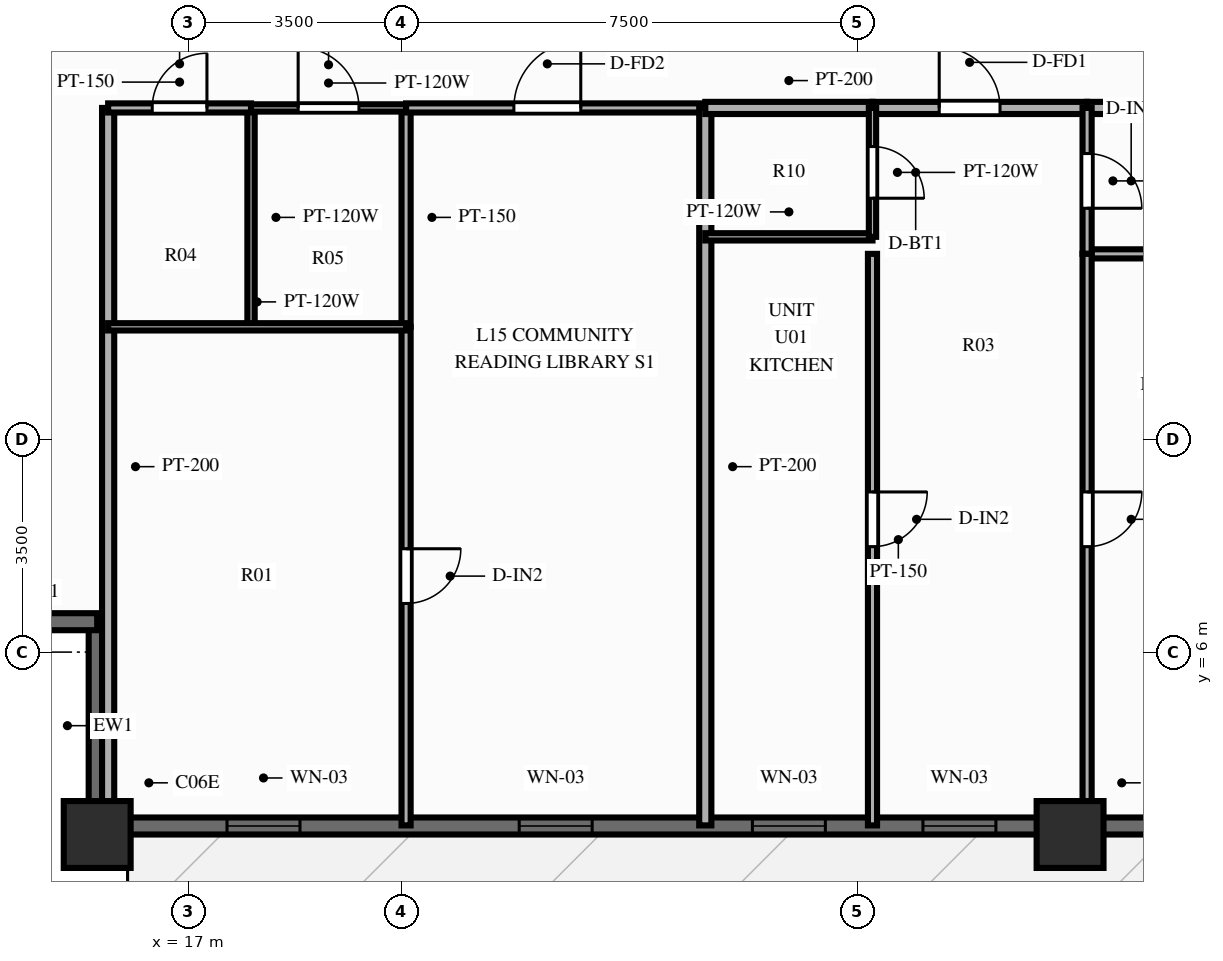
"""IFC4 building model, lengths in metres.
Left out: names, types, materials, properties, quantities, classifications, styles, units other than length and angle.
Written with IfcOpenShell. Run it as: python <this file> out.ifc"""

import sys

from ifc_helpers import new_model, si_unit, direction, frame, frame_2d, origin, origin_2d, place, context, subcontext, project, spatial, rectangle, extrude, source, transform, mapped, element, fill, save


model = new_model("IFC4")
c1 = context("Model", 3, precision=1e-05, world=origin(), true_north=direction((0.0, 1.0)))
c2 = subcontext(c1, "Body", "Model", "MODEL_VIEW")
j1 = project(units=[si_unit("LENGTHUNIT", "METRE"), si_unit("PLANEANGLEUNIT", "RADIAN")], contexts=[c1])
p1 = place(None, origin())
s1 = spatial("IfcSite", under=j1, at=p1, CompositionType="ELEMENT")
p2 = place(p1, origin())
s2 = spatial("IfcBuilding", under=s1, at=p2, CompositionType="ELEMENT")
p3 = place(p2, frame((0.0, 0.0, 49.4)))
s3 = spatial("IfcBuildingStorey", under=s2, at=p3, CompositionType="ELEMENT", Elevation=49.4)
m1 = source(origin(), c2, "Body", "SweptSolid", [
    extrude(rectangle(XDim=1.1, YDim=1.1, at=origin_2d()), origin(), (0.0, 0.0, 1.0), 3.0),
])
for number, where, z_axis, x_axis in (
    (1, (15.5, 3.0, 0.0), (0.0, 0.0, 1.0), (1.0, 0.0, 0.0)),
    (2, (31.5, 3.0, 0.0), (0.0, 0.0, 1.0), (1.0, 0.0, 0.0)),
):
    element("IfcColumn", number, at=place(p3, frame(where, z_axis=z_axis, x_axis=x_axis)), inside=s3, PredefinedType="COLUMN", context=c2, shape_type="MappedRepresentation", body=[
        mapped(m1, transform((0.0, 0.0, 0.0), scale=1.0)),
    ])
p4 = place(p3, frame((15.5, 3.14, 0.0), z_axis=(0.0, 0.0, 1.0), x_axis=(1.0, 0.0, 0.0)))
e3 = element("IfcWall", 3, at=p4, inside=s3, PredefinedType="SOLIDWALL", context=c2, shape_type="SweptSolid", body=[
    extrude(rectangle(XDim=45.0, YDim=0.28, at=frame_2d((22.5, 0.0))), origin(), (0.0, 0.0, 1.0), 2.28),
])
p5 = place(p4, frame((2.135, 0.0, 0.25)))
e4 = element("IfcOpeningElement", 4, at=p5, cuts=e3, PredefinedType="OPENING", context=c2, shape_type="SweptSolid", body=[
    extrude(rectangle(XDim=1.2, YDim=1.5, at=frame_2d((0.6, 0.75))), frame((0.0, 0.152, 0.0), z_axis=(0.0, -1.0, 0.0), x_axis=(1.0, 0.0, 0.0)), (0.0, 0.0, 1.0), 0.304),
])
p6 = place(p4, frame((6.94, 0.0, 0.25)))
e5 = element("IfcOpeningElement", 5, at=p6, cuts=e3, PredefinedType="OPENING", context=c2, shape_type="SweptSolid", body=[
    extrude(rectangle(XDim=1.2, YDim=1.5, at=frame_2d((0.6, 0.75))), frame((0.0, 0.152, 0.0), z_axis=(0.0, -1.0, 0.0), x_axis=(1.0, 0.0, 0.0)), (0.0, 0.0, 1.0), 0.304),
])
p7 = place(p4, frame((10.776, 0.0, 0.25)))
e6 = element("IfcOpeningElement", 6, at=p7, cuts=e3, PredefinedType="OPENING", context=c2, shape_type="SweptSolid", body=[
    extrude(rectangle(XDim=1.2, YDim=1.5, at=frame_2d((0.6, 0.75))), frame((0.0, 0.152, 0.0), z_axis=(0.0, -1.0, 0.0), x_axis=(1.0, 0.0, 0.0)), (0.0, 0.0, 1.0), 0.304),
])
p8 = place(p4, frame((13.58, 0.0, 0.25)))
e7 = element("IfcOpeningElement", 7, at=p8, cuts=e3, PredefinedType="OPENING", context=c2, shape_type="SweptSolid", body=[
    extrude(rectangle(XDim=1.2, YDim=1.5, at=frame_2d((0.6, 0.75))), frame((0.0, 0.152, 0.0), z_axis=(0.0, -1.0, 0.0), x_axis=(1.0, 0.0, 0.0)), (0.0, 0.0, 1.0), 0.304),
])
p9 = place(p4, frame((17.506, 0.0, 0.25)))
e8 = element("IfcOpeningElement", 8, at=p9, cuts=e3, PredefinedType="OPENING", context=c2, shape_type="SweptSolid", body=[
    extrude(rectangle(XDim=1.2, YDim=1.5, at=frame_2d((0.6, 0.75))), frame((0.0, 0.152, 0.0), z_axis=(0.0, -1.0, 0.0), x_axis=(1.0, 0.0, 0.0)), (0.0, 0.0, 1.0), 0.304),
])
p10 = place(p4, frame((22.822, 0.0, 0.0), z_axis=(0.0, 0.0, 1.0), x_axis=(-1.0, 0.0, 0.0)))
e9 = element("IfcOpeningElement", 9, at=p10, cuts=e3, PredefinedType="OPENING", context=c2, shape_type="SweptSolid", body=[
    extrude(rectangle(XDim=1.1, YDim=2.15, at=frame_2d((0.55, 1.075))), frame((0.0, 0.152, 0.0), z_axis=(0.0, -1.0, 0.0), x_axis=(1.0, 0.0, 0.0)), (0.0, 0.0, 1.0), 0.304),
])
p11 = place(p4, frame((26.066, 0.0, 0.25)))
e10 = element("IfcOpeningElement", 10, at=p11, cuts=e3, PredefinedType="OPENING", context=c2, shape_type="SweptSolid", body=[
    extrude(rectangle(XDim=1.2, YDim=1.5, at=frame_2d((0.6, 0.75))), frame((0.0, 0.152, 0.0), z_axis=(0.0, -1.0, 0.0), x_axis=(1.0, 0.0, 0.0)), (0.0, 0.0, 1.0), 0.304),
])
p12 = place(p4, frame((30.255, 0.0, 0.25)))
e11 = element("IfcOpeningElement", 11, at=p12, cuts=e3, PredefinedType="OPENING", context=c2, shape_type="SweptSolid", body=[
    extrude(rectangle(XDim=1.2, YDim=1.5, at=frame_2d((0.6, 0.75))), frame((0.0, 0.152, 0.0), z_axis=(0.0, -1.0, 0.0), x_axis=(1.0, 0.0, 0.0)), (0.0, 0.0, 1.0), 0.304),
])
p13 = place(p4, frame((33.346, 0.0, 0.25)))
e12 = element("IfcOpeningElement", 12, at=p13, cuts=e3, PredefinedType="OPENING", context=c2, shape_type="SweptSolid", body=[
    extrude(rectangle(XDim=1.2, YDim=1.5, at=frame_2d((0.6, 0.75))), frame((0.0, 0.152, 0.0), z_axis=(0.0, -1.0, 0.0), x_axis=(1.0, 0.0, 0.0)), (0.0, 0.0, 1.0), 0.304),
])
p14 = place(p4, frame((37.821, 0.0, 0.25)))
e13 = element("IfcOpeningElement", 13, at=p14, cuts=e3, PredefinedType="OPENING", context=c2, shape_type="SweptSolid", body=[
    extrude(rectangle(XDim=1.2, YDim=1.5, at=frame_2d((0.6, 0.75))), frame((0.0, 0.152, 0.0), z_axis=(0.0, -1.0, 0.0), x_axis=(1.0, 0.0, 0.0)), (0.0, 0.0, 1.0), 0.304),
])
p15 = place(p4, frame((42.341, 0.0, 0.25)))
e14 = element("IfcOpeningElement", 14, at=p15, cuts=e3, PredefinedType="OPENING", context=c2, shape_type="SweptSolid", body=[
    extrude(rectangle(XDim=1.2, YDim=1.5, at=frame_2d((0.6, 0.75))), frame((0.0, 0.152, 0.0), z_axis=(0.0, -1.0, 0.0), x_axis=(1.0, 0.0, 0.0)), (0.0, 0.0, 1.0), 0.304),
])
for number, where, z_axis, x_axis in (
    (15, (15.5, 3.08, 0.0), (0.0, 0.0, 1.0), (0.0, 1.0, 0.0)),
    (16, (12.08, 6.5, 0.0), (0.0, 0.0, 1.0), (1.0, 0.0, 0.0)),
):
    element("IfcWall", number, at=place(p3, frame(where, z_axis=z_axis, x_axis=x_axis)), inside=s3, PredefinedType="SOLIDWALL", context=c2, shape_type="SweptSolid", body=[
        extrude(rectangle(XDim=3.42, YDim=0.28, at=frame_2d((1.71, 0.0))), origin(), (0.0, 0.0, 1.0), 2.28),
    ])
p16 = place(p3, frame((15.68, 14.95, 0.0), z_axis=(0.0, 0.0, 1.0), x_axis=(0.0, -1.0, 0.0)))
e17 = element("IfcWall", 17, at=p16, inside=s3, PredefinedType="PARTITIONING", context=c2, shape_type="SweptSolid", body=[
    extrude(rectangle(XDim=11.8, YDim=0.2, at=frame_2d((5.9, 0.0))), origin(), (0.0, 0.0, 1.0), 2.79),
])
p17 = place(p3, frame((18.03, 14.95, 0.0), z_axis=(0.0, 0.0, 1.0), x_axis=(0.0, -1.0, 0.0)))
e18 = element("IfcWall", 18, at=p17, inside=s3, PredefinedType="PARTITIONING", context=c2, shape_type="SweptSolid", body=[
    extrude(rectangle(XDim=3.6, YDim=0.12, at=frame_2d((1.8, 0.0))), origin(), (0.0, 0.0, 1.0), 2.79),
])
p18 = place(p3, frame((20.58, 14.95, 0.0), z_axis=(0.0, 0.0, 1.0), x_axis=(0.0, -1.0, 0.0)))
e19 = element("IfcWall", 19, at=p18, inside=s3, PredefinedType="PARTITIONING", context=c2, shape_type="SweptSolid", body=[
    extrude(rectangle(XDim=3.6, YDim=0.15, at=frame_2d((1.8, 0.0))), origin(), (0.0, 0.0, 1.0), 2.79),
])
p19 = place(p3, frame((20.58, 11.35, 0.0), z_axis=(0.0, 0.0, 1.0), x_axis=(0.0, -1.0, 0.0)))
e20 = element("IfcWall", 20, at=p19, inside=s3, PredefinedType="PARTITIONING", context=c2, shape_type="SweptSolid", body=[
    extrude(rectangle(XDim=8.2, YDim=0.15, at=frame_2d((4.1, 0.0))), origin(), (0.0, 0.0, 1.0), 2.79),
])
p20 = place(p19, frame((3.65, 0.0, 0.0)))
e21 = element("IfcOpeningElement", 21, at=p20, cuts=e20, PredefinedType="OPENING", context=c2, shape_type="SweptSolid", body=[
    extrude(rectangle(XDim=0.9, YDim=2.1, at=frame_2d((0.45, 1.05))), frame((0.0, 0.087, 0.0), z_axis=(0.0, -1.0, 0.0), x_axis=(1.0, 0.0, 0.0)), (0.0, 0.0, 1.0), 0.174),
])
p21 = place(p3, frame((15.68, 11.35, 0.0), z_axis=(0.0, 0.0, 1.0), x_axis=(1.0, 0.0, 0.0)))
e22 = element("IfcWall", 22, at=p21, inside=s3, PredefinedType="PARTITIONING", context=c2, shape_type="SweptSolid", body=[
    extrude(rectangle(XDim=4.9, YDim=0.12, at=frame_2d((2.45, 0.0))), origin(), (0.0, 0.0, 1.0), 2.79),
])
p22 = place(p3, frame((15.68, 14.95, 0.0), z_axis=(0.0, 0.0, 1.0), x_axis=(1.0, 0.0, 0.0)))
e23 = element("IfcWall", 23, at=p22, inside=s3, PredefinedType="PARTITIONING", context=c2, shape_type="SweptSolid", body=[
    extrude(rectangle(XDim=2.35, YDim=0.15, at=frame_2d((1.175, 0.0))), origin(), (0.0, 0.0, 1.0), 2.79),
])
p23 = place(p22, frame((0.725, 0.0, 0.0)))
e24 = element("IfcOpeningElement", 24, at=p23, cuts=e23, PredefinedType="OPENING", context=c2, shape_type="SweptSolid", body=[
    extrude(rectangle(XDim=0.9, YDim=2.1, at=frame_2d((0.45, 1.05))), frame((0.0, 0.087, 0.0), z_axis=(0.0, -1.0, 0.0), x_axis=(1.0, 0.0, 0.0)), (0.0, 0.0, 1.0), 0.174),
])
p24 = place(p3, frame((18.03, 14.95, 0.0), z_axis=(0.0, 0.0, 1.0), x_axis=(1.0, 0.0, 0.0)))
e25 = element("IfcWall", 25, at=p24, inside=s3, PredefinedType="PARTITIONING", context=c2, shape_type="SweptSolid", body=[
    extrude(rectangle(XDim=2.55, YDim=0.12, at=frame_2d((1.275, 0.0))), origin(), (0.0, 0.0, 1.0), 2.79),
])
p25 = place(p24, frame((0.775, 0.0, 0.0)))
e26 = element("IfcOpeningElement", 26, at=p25, cuts=e25, PredefinedType="OPENING", context=c2, shape_type="SweptSolid", body=[
    extrude(rectangle(XDim=1.0, YDim=2.1, at=frame_2d((0.5, 1.05))), frame((0.0, 0.072, 0.0), z_axis=(0.0, -1.0, 0.0), x_axis=(1.0, 0.0, 0.0)), (0.0, 0.0, 1.0), 0.144),
])
p26 = place(p3, frame((20.58, 14.95, 0.0), z_axis=(0.0, 0.0, 1.0), x_axis=(1.0, 0.0, 0.0)))
e27 = element("IfcWall", 27, at=p26, inside=s3, PredefinedType="PARTITIONING", context=c2, shape_type="SweptSolid", body=[
    extrude(rectangle(XDim=4.921, YDim=0.15, at=frame_2d((2.46, 0.0))), origin(), (0.0, 0.0, 1.0), 2.79),
])
p27 = place(p26, frame((1.773, 0.0, 0.0)))
e28 = element("IfcOpeningElement", 28, at=p27, cuts=e27, PredefinedType="OPENING", context=c2, shape_type="SweptSolid", body=[
    extrude(rectangle(XDim=1.1, YDim=2.15, at=frame_2d((0.55, 1.075))), frame((0.0, 0.087, 0.0), z_axis=(0.0, -1.0, 0.0), x_axis=(1.0, 0.0, 0.0)), (0.0, 0.0, 1.0), 0.174),
])
p28 = place(p3, frame((25.501, 14.95, 0.0), z_axis=(0.0, 0.0, 1.0), x_axis=(0.0, -1.0, 0.0)))
e29 = element("IfcWall", 29, at=p28, inside=s3, PredefinedType="PARTITIONING", context=c2, shape_type="SweptSolid", body=[
    extrude(rectangle(XDim=11.8, YDim=0.2, at=frame_2d((5.9, 0.0))), origin(), (0.0, 0.0, 1.0), 2.79),
])
p29 = place(p3, frame((25.501, 14.95, 0.0), z_axis=(0.0, 0.0, 1.0), x_axis=(1.0, 0.0, 0.0)))
e30 = element("IfcWall", 30, at=p29, inside=s3, PredefinedType="PARTITIONING", context=c2, shape_type="SweptSolid", body=[
    extrude(rectangle(XDim=2.75, YDim=0.2, at=frame_2d((1.375, 0.0))), origin(), (0.0, 0.0, 1.0), 2.79),
])
p30 = place(p3, frame((28.25, 14.95, 0.0), z_axis=(0.0, 0.0, 1.0), x_axis=(1.0, 0.0, 0.0)))
e31 = element("IfcWall", 31, at=p30, inside=s3, PredefinedType="PARTITIONING", context=c2, shape_type="SweptSolid", body=[
    extrude(rectangle(XDim=3.53, YDim=0.2, at=frame_2d((1.765, 0.0))), origin(), (0.0, 0.0, 1.0), 2.79),
])
p31 = place(p30, frame((1.097, 0.0, 0.0)))
e32 = element("IfcOpeningElement", 32, at=p31, cuts=e31, PredefinedType="OPENING", context=c2, shape_type="SweptSolid", body=[
    extrude(rectangle(XDim=1.0, YDim=2.15, at=frame_2d((0.5, 1.075))), frame((0.0, 0.112, 0.0), z_axis=(0.0, -1.0, 0.0), x_axis=(1.0, 0.0, 0.0)), (0.0, 0.0, 1.0), 0.224),
])
p32 = place(p3, frame((31.78, 14.95, 0.0), z_axis=(0.0, 0.0, 1.0), x_axis=(1.0, 0.0, 0.0)))
e33 = element("IfcWall", 33, at=p32, inside=s3, PredefinedType="PARTITIONING", context=c2, shape_type="SweptSolid", body=[
    extrude(rectangle(XDim=3.542, YDim=0.2, at=frame_2d((1.771, 0.0))), origin(), (0.0, 0.0, 1.0), 2.79),
])
p33 = place(p3, frame((25.501, 12.83, 0.0), z_axis=(0.0, 0.0, 1.0), x_axis=(1.0, 0.0, 0.0)))
e34 = element("IfcWall", 34, at=p33, inside=s3, PredefinedType="PARTITIONING", context=c2, shape_type="SweptSolid", body=[
    extrude(rectangle(XDim=2.75, YDim=0.12, at=frame_2d((1.375, 0.0))), origin(), (0.0, 0.0, 1.0), 2.79),
])
p34 = place(p3, frame((31.78, 12.55, 0.0), z_axis=(0.0, 0.0, 1.0), x_axis=(1.0, 0.0, 0.0)))
e35 = element("IfcWall", 35, at=p34, inside=s3, PredefinedType="PARTITIONING", context=c2, shape_type="SweptSolid", body=[
    extrude(rectangle(XDim=3.542, YDim=0.15, at=frame_2d((1.771, 0.0))), origin(), (0.0, 0.0, 1.0), 2.79),
])
p35 = place(p3, frame((28.25, 14.95, 0.0), z_axis=(0.0, 0.0, 1.0), x_axis=(0.0, -1.0, 0.0)))
e36 = element("IfcWall", 36, at=p35, inside=s3, PredefinedType="PARTITIONING", context=c2, shape_type="SweptSolid", body=[
    extrude(rectangle(XDim=2.12, YDim=0.12, at=frame_2d((1.06, 0.0))), origin(), (0.0, 0.0, 1.0), 2.79),
])
p36 = place(p35, frame((0.635, 0.0, 0.0)))
e37 = element("IfcOpeningElement", 37, at=p36, cuts=e36, PredefinedType="OPENING", context=c2, shape_type="SweptSolid", body=[
    extrude(rectangle(XDim=0.85, YDim=2.05, at=frame_2d((0.425, 1.025))), frame((0.0, 0.072, 0.0), z_axis=(0.0, -1.0, 0.0), x_axis=(1.0, 0.0, 0.0)), (0.0, 0.0, 1.0), 0.144),
])
p37 = place(p3, frame((28.25, 12.55, 0.0), z_axis=(0.0, 0.0, 1.0), x_axis=(0.0, -1.0, 0.0)))
e38 = element("IfcWall", 38, at=p37, inside=s3, PredefinedType="PARTITIONING", context=c2, shape_type="SweptSolid", body=[
    extrude(rectangle(XDim=9.4, YDim=0.15, at=frame_2d((4.7, 0.0))), origin(), (0.0, 0.0, 1.0), 2.79),
])
p38 = place(p37, frame((3.916, 0.0, 0.0)))
e39 = element("IfcOpeningElement", 39, at=p38, cuts=e38, PredefinedType="OPENING", context=c2, shape_type="SweptSolid", body=[
    extrude(rectangle(XDim=0.9, YDim=2.1, at=frame_2d((0.45, 1.05))), frame((0.0, 0.087, 0.0), z_axis=(0.0, -1.0, 0.0), x_axis=(1.0, 0.0, 0.0)), (0.0, 0.0, 1.0), 0.174),
])
p39 = place(p3, frame((31.78, 14.95, 0.0), z_axis=(0.0, 0.0, 1.0), x_axis=(0.0, -1.0, 0.0)))
e40 = element("IfcWall", 40, at=p39, inside=s3, PredefinedType="PARTITIONING", context=c2, shape_type="SweptSolid", body=[
    extrude(rectangle(XDim=2.4, YDim=0.15, at=frame_2d((1.2, 0.0))), origin(), (0.0, 0.0, 1.0), 2.79),
])
p40 = place(p39, frame((0.75, 0.0, 0.0)))
e41 = element("IfcOpeningElement", 41, at=p40, cuts=e40, PredefinedType="OPENING", context=c2, shape_type="SweptSolid", body=[
    extrude(rectangle(XDim=0.9, YDim=2.1, at=frame_2d((0.45, 1.05))), frame((0.0, 0.087, 0.0), z_axis=(0.0, -1.0, 0.0), x_axis=(1.0, 0.0, 0.0)), (0.0, 0.0, 1.0), 0.174),
])
p41 = place(p3, frame((31.78, 12.55, 0.0), z_axis=(0.0, 0.0, 1.0), x_axis=(0.0, -1.0, 0.0)))
e42 = element("IfcWall", 42, at=p41, inside=s3, PredefinedType="PARTITIONING", context=c2, shape_type="SweptSolid", body=[
    extrude(rectangle(XDim=9.4, YDim=0.15, at=frame_2d((4.7, 0.0))), origin(), (0.0, 0.0, 1.0), 2.79),
])
p42 = place(p41, frame((3.916, 0.0, 0.0)))
e43 = element("IfcOpeningElement", 43, at=p42, cuts=e42, PredefinedType="OPENING", context=c2, shape_type="SweptSolid", body=[
    extrude(rectangle(XDim=0.9, YDim=2.1, at=frame_2d((0.45, 1.05))), frame((0.0, 0.087, 0.0), z_axis=(0.0, -1.0, 0.0), x_axis=(1.0, 0.0, 0.0)), (0.0, 0.0, 1.0), 0.174),
])
m2 = source(origin(), c2, "Body", "SweptSolid", [
    extrude(rectangle(XDim=1.2, YDim=1.5, at=frame_2d((0.6, 0.75))), frame((0.0, 0.03, 0.0), z_axis=(0.0, -1.0, 0.0), x_axis=(1.0, 0.0, 0.0)), (0.0, 0.0, 1.0), 0.06),
])
p43 = place(p5, origin())
e44 = element("IfcWindow", 44, at=p43, inside=s3, PartitioningType="SINGLE_PANEL", PredefinedType="WINDOW", context=c2, shape_type="MappedRepresentation", body=[
    mapped(m2, transform((0.0, 0.0, 0.0), scale=1.0)),
])
fill(e4, e44)
p44 = place(p6, origin())
e45 = element("IfcWindow", 45, at=p44, inside=s3, PartitioningType="SINGLE_PANEL", PredefinedType="WINDOW", context=c2, shape_type="MappedRepresentation", body=[
    mapped(m2, transform((0.0, 0.0, 0.0), scale=1.0)),
])
fill(e5, e45)
p45 = place(p7, origin())
e46 = element("IfcWindow", 46, at=p45, inside=s3, PartitioningType="SINGLE_PANEL", PredefinedType="WINDOW", context=c2, shape_type="MappedRepresentation", body=[
    mapped(m2, transform((0.0, 0.0, 0.0), scale=1.0)),
])
fill(e6, e46)
p46 = place(p8, origin())
e47 = element("IfcWindow", 47, at=p46, inside=s3, PartitioningType="SINGLE_PANEL", PredefinedType="WINDOW", context=c2, shape_type="MappedRepresentation", body=[
    mapped(m2, transform((0.0, 0.0, 0.0), scale=1.0)),
])
fill(e7, e47)
m3 = source(origin(), c2, "Body", "SweptSolid", [
    extrude(rectangle(XDim=0.9, YDim=2.1, at=frame_2d((0.45, 1.05))), frame((0.0, 0.025, 0.0), z_axis=(0.0, -1.0, 0.0), x_axis=(1.0, 0.0, 0.0)), (0.0, 0.0, 1.0), 0.05),
])
p47 = place(p20, origin())
e48 = element("IfcDoor", 48, at=p47, inside=s3, OperationType="SINGLE_SWING_LEFT", PredefinedType="DOOR", context=c2, shape_type="MappedRepresentation", body=[
    mapped(m3, transform((0.0, 0.0, 0.0), scale=1.0)),
])
fill(e21, e48)
p48 = place(p23, origin())
e49 = element("IfcDoor", 49, at=p48, inside=s3, OperationType="SINGLE_SWING_RIGHT", PredefinedType="DOOR", context=c2, shape_type="MappedRepresentation", body=[
    mapped(m3, transform((0.0, 0.0, 0.0), scale=1.0)),
])
fill(e24, e49)
m4 = source(origin(), c2, "Body", "SweptSolid", [
    extrude(rectangle(XDim=1.0, YDim=2.1, at=frame_2d((0.5, 1.05))), frame((0.0, 0.025, 0.0), z_axis=(0.0, -1.0, 0.0), x_axis=(1.0, 0.0, 0.0)), (0.0, 0.0, 1.0), 0.05),
])
p49 = place(p25, origin())
e50 = element("IfcDoor", 50, at=p49, inside=s3, OperationType="SINGLE_SWING_LEFT", PredefinedType="DOOR", context=c2, shape_type="MappedRepresentation", body=[
    mapped(m4, transform((0.0, 0.0, 0.0), scale=1.0)),
])
fill(e26, e50)
m5 = source(origin(), c2, "Body", "SweptSolid", [
    extrude(rectangle(XDim=1.1, YDim=2.15, at=frame_2d((0.55, 1.075))), frame((0.0, 0.025, 0.0), z_axis=(0.0, -1.0, 0.0), x_axis=(1.0, 0.0, 0.0)), (0.0, 0.0, 1.0), 0.05),
])
p50 = place(p27, origin())
e51 = element("IfcDoor", 51, at=p50, inside=s3, OperationType="SINGLE_SWING_RIGHT", PredefinedType="DOOR", context=c2, shape_type="MappedRepresentation", body=[
    mapped(m5, transform((0.0, 0.0, 0.0), scale=1.0)),
])
fill(e28, e51)
m6 = source(origin(), c2, "Body", "SweptSolid", [
    extrude(rectangle(XDim=1.0, YDim=2.15, at=frame_2d((0.5, 1.075))), frame((0.0, 0.025, 0.0), z_axis=(0.0, -1.0, 0.0), x_axis=(1.0, 0.0, 0.0)), (0.0, 0.0, 1.0), 0.05),
])
p51 = place(p31, origin())
e52 = element("IfcDoor", 52, at=p51, inside=s3, OperationType="SINGLE_SWING_LEFT", PredefinedType="DOOR", context=c2, shape_type="MappedRepresentation", body=[
    mapped(m6, transform((0.0, 0.0, 0.0), scale=1.0)),
])
fill(e32, e52)
m7 = source(origin(), c2, "Body", "SweptSolid", [
    extrude(rectangle(XDim=0.85, YDim=2.05, at=frame_2d((0.425, 1.025))), frame((0.0, 0.025, 0.0), z_axis=(0.0, -1.0, 0.0), x_axis=(1.0, 0.0, 0.0)), (0.0, 0.0, 1.0), 0.05),
])
p52 = place(p36, origin())
e53 = element("IfcDoor", 53, at=p52, inside=s3, OperationType="SINGLE_SWING_RIGHT", PredefinedType="DOOR", context=c2, shape_type="MappedRepresentation", body=[
    mapped(m7, transform((0.0, 0.0, 0.0), scale=1.0)),
])
fill(e37, e53)
p53 = place(p38, origin())
e54 = element("IfcDoor", 54, at=p53, inside=s3, OperationType="SINGLE_SWING_LEFT", PredefinedType="DOOR", context=c2, shape_type="MappedRepresentation", body=[
    mapped(m3, transform((0.0, 0.0, 0.0), scale=1.0)),
])
fill(e39, e54)
p54 = place(p40, origin())
e55 = element("IfcDoor", 55, at=p54, inside=s3, OperationType="SINGLE_SWING_RIGHT", PredefinedType="DOOR", context=c2, shape_type="MappedRepresentation", body=[
    mapped(m3, transform((0.0, 0.0, 0.0), scale=1.0)),
])
fill(e41, e55)
p55 = place(p42, origin())
e56 = element("IfcDoor", 56, at=p55, inside=s3, OperationType="SINGLE_SWING_LEFT", PredefinedType="DOOR", context=c2, shape_type="MappedRepresentation", body=[
    mapped(m3, transform((0.0, 0.0, 0.0), scale=1.0)),
])
fill(e43, e56)
save(model, sys.argv[1])
